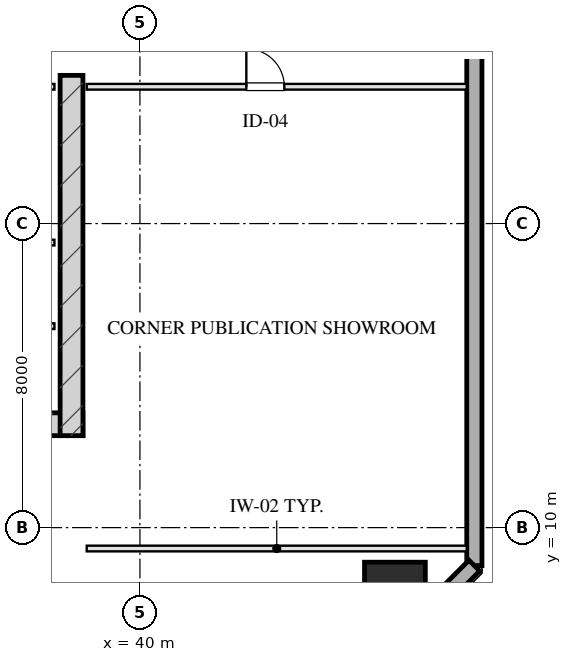
"""IFC4 building model, lengths in metres.
Left out: names, types, materials, properties, quantities, classifications, styles, units other than length and angle.
Written with IfcOpenShell. Run it as: python <this file> out.ifc"""

import sys

from ifc_helpers import new_model, si_unit, direction, frame, frame_2d, origin, origin_2d, place, context, subcontext, project, spatial, rectangle, hollow_rectangle, extrude, element, fill, save


model = new_model("IFC4")
c1 = context("Model", 3, precision=1e-05, world=origin(), true_north=direction((0.0, 1.0)))
c2 = subcontext(c1, "Body", "Model", "MODEL_VIEW")
j1 = project(units=[si_unit("LENGTHUNIT", "METRE"), si_unit("PLANEANGLEUNIT", "RADIAN")], contexts=[c1])
p1 = place(None, origin())
s1 = spatial("IfcSite", under=j1, at=p1, CompositionType="ELEMENT")
p2 = place(p1, origin())
s2 = spatial("IfcBuilding", under=s1, at=p2, CompositionType="ELEMENT")
p3 = place(p2, frame((0.0, 0.0, 120.75)))
s3 = spatial("IfcBuildingStorey", under=s2, at=p3, CompositionType="ELEMENT", Elevation=120.75)
p4 = place(p3, frame((21.5, 12.72, 0.0), z_axis=(0.0, 0.0, 1.0), x_axis=(1.0, 0.0, 0.0)))
e1 = element("IfcWall", 1, at=p4, inside=s3, PredefinedType="SHEAR", context=c2, shape_type="SweptSolid", body=[
    extrude(rectangle(XDim=17.0, YDim=0.6, at=frame_2d((8.5, 0.0))), origin(), (0.0, 0.0, 1.0), 3.45),
])
p5 = place(p3, frame((38.2, 21.9, 0.0), z_axis=(0.0, 0.0, 1.0), x_axis=(0.0, -1.0, 0.0)))
e2 = element("IfcWall", 2, at=p5, inside=s3, PredefinedType="SHEAR", context=c2, shape_type="SweptSolid", body=[
    extrude(rectangle(XDim=9.48, YDim=0.6, at=frame_2d((4.74, 0.0))), origin(), (0.0, 0.0, 1.0), 3.45),
])
p6 = place(p3, frame((46.71, 8.29, 0.0), z_axis=(0.0, 0.0, 1.0), x_axis=(1.0, 0.0, 0.0)))
e3 = element("IfcColumn", 3, at=p6, inside=s3, PredefinedType="COLUMN", context=c2, shape_type="SweptSolid", body=[
    extrude(hollow_rectangle(XDim=1.6, YDim=1.6, WallThickness=0.055, at=origin_2d()), origin(), (0.0, 0.0, 1.0), 3.451),
])
p7 = place(p3, frame((48.8, 59.0, 0.0), z_axis=(0.0, 0.0, 1.0), x_axis=(0.0, -1.0, 0.0)))
e4 = element("IfcWall", 4, at=p7, inside=s3, PredefinedType="SOLIDWALL", context=c2, shape_type="SweptSolid", body=[
    extrude(rectangle(XDim=50.0, YDim=0.4, at=frame_2d((25.0, 0.0))), origin(), (0.0, 0.0, 1.0), 2.61),
])
p8 = place(p7, frame((18.583, 0.0, 0.0)))
e5 = element("IfcOpeningElement", 5, at=p8, cuts=e4, PredefinedType="OPENING", context=c2, shape_type="SweptSolid", body=[
    extrude(rectangle(XDim=1.1, YDim=2.15, at=frame_2d((0.55, 1.075))), frame((0.0, 0.21, 0.0), z_axis=(0.0, -1.0, 0.0), x_axis=(1.0, 0.0, 0.0)), (0.0, 0.0, 1.0), 0.42),
])
p9 = place(p3, frame((48.8, 9.0, 0.0), z_axis=(0.0, 0.0, 1.0), x_axis=(-0.707106781187, -0.707106781187, 0.0)))
e6 = element("IfcWall", 6, at=p9, inside=s3, PredefinedType="SOLIDWALL", context=c2, shape_type="SweptSolid", body=[
    extrude(rectangle(XDim=3.96, YDim=0.4, at=frame_2d((1.98, 0.0))), origin(), (0.0, 0.0, 1.0), 2.61),
])
p10 = place(p3, frame((33.95, 21.6, 0.0), z_axis=(0.0, 0.0, 1.0), x_axis=(1.0, 0.0, 0.0)))
e7 = element("IfcWall", 7, at=p10, inside=s3, PredefinedType="PARTITIONING", context=c2, shape_type="SweptSolid", body=[
    extrude(rectangle(XDim=3.8, YDim=0.15, at=frame_2d((1.9, 0.0))), origin(), (0.0, 0.0, 1.0), 3.175),
])
p11 = place(p10, frame((0.22, 0.0, 0.0)))
e8 = element("IfcOpeningElement", 8, at=p11, cuts=e7, PredefinedType="OPENING", context=c2, shape_type="SweptSolid", body=[
    extrude(rectangle(XDim=0.95, YDim=2.05, at=frame_2d((0.475, 1.025))), frame((0.0, 0.085, 0.0), z_axis=(0.0, -1.0, 0.0), x_axis=(1.0, 0.0, 0.0)), (0.0, 0.0, 1.0), 0.17),
])
for number, where, z_axis, x_axis in (
    (9, (35.45, 17.5, 0.0), (0.0, 0.0, 1.0), (1.0, 0.0, 0.0)),
    (10, (35.45, 15.3, 0.0), (0.0, 0.0, 1.0), (1.0, 0.0, 0.0)),
):
    element("IfcWall", number, at=place(p3, frame(where, z_axis=z_axis, x_axis=x_axis)), inside=s3, PredefinedType="PARTITIONING", context=c2, shape_type="SweptSolid", body=[
        extrude(rectangle(XDim=2.3, YDim=0.15, at=frame_2d((1.15, 0.0))), origin(), (0.0, 0.0, 1.0), 3.175),
    ])
p12 = place(p3, frame((38.6, 9.45, 0.0), z_axis=(0.0, 0.0, 1.0), x_axis=(1.0, 0.0, 0.0)))
e11 = element("IfcWall", 11, at=p12, inside=s3, PredefinedType="PARTITIONING", context=c2, shape_type="SweptSolid", body=[
    extrude(rectangle(XDim=10.0, YDim=0.15, at=frame_2d((5.0, 0.0))), origin(), (0.0, 0.0, 1.0), 3.175),
])
p13 = place(p3, frame((38.6, 21.6, 0.0), z_axis=(0.0, 0.0, 1.0), x_axis=(1.0, 0.0, 0.0)))
e12 = element("IfcWall", 12, at=p13, inside=s3, PredefinedType="PARTITIONING", context=c2, shape_type="SweptSolid", body=[
    extrude(rectangle(XDim=10.0, YDim=0.15, at=frame_2d((5.0, 0.0))), origin(), (0.0, 0.0, 1.0), 3.175),
])
p14 = place(p13, frame((4.2, 0.0, 0.0)))
e13 = element("IfcOpeningElement", 13, at=p14, cuts=e12, PredefinedType="OPENING", context=c2, shape_type="SweptSolid", body=[
    extrude(rectangle(XDim=1.0, YDim=2.05, at=frame_2d((0.5, 1.025))), frame((0.0, 0.085, 0.0), z_axis=(0.0, -1.0, 0.0), x_axis=(1.0, 0.0, 0.0)), (0.0, 0.0, 1.0), 0.17),
])
p15 = place(p14, origin())
e14 = element("IfcDoor", 14, at=p15, inside=s3, OperationType="SINGLE_SWING_LEFT", PredefinedType="DOOR", context=c2, shape_type="SweptSolid", body=[
    extrude(rectangle(XDim=1.0, YDim=2.05, at=frame_2d((0.5, 1.025))), frame((0.0, 0.025, 0.0), z_axis=(0.0, -1.0, 0.0), x_axis=(1.0, 0.0, 0.0)), (0.0, 0.0, 1.0), 0.05),
])
fill(e13, e14)
save(model, sys.argv[1])
